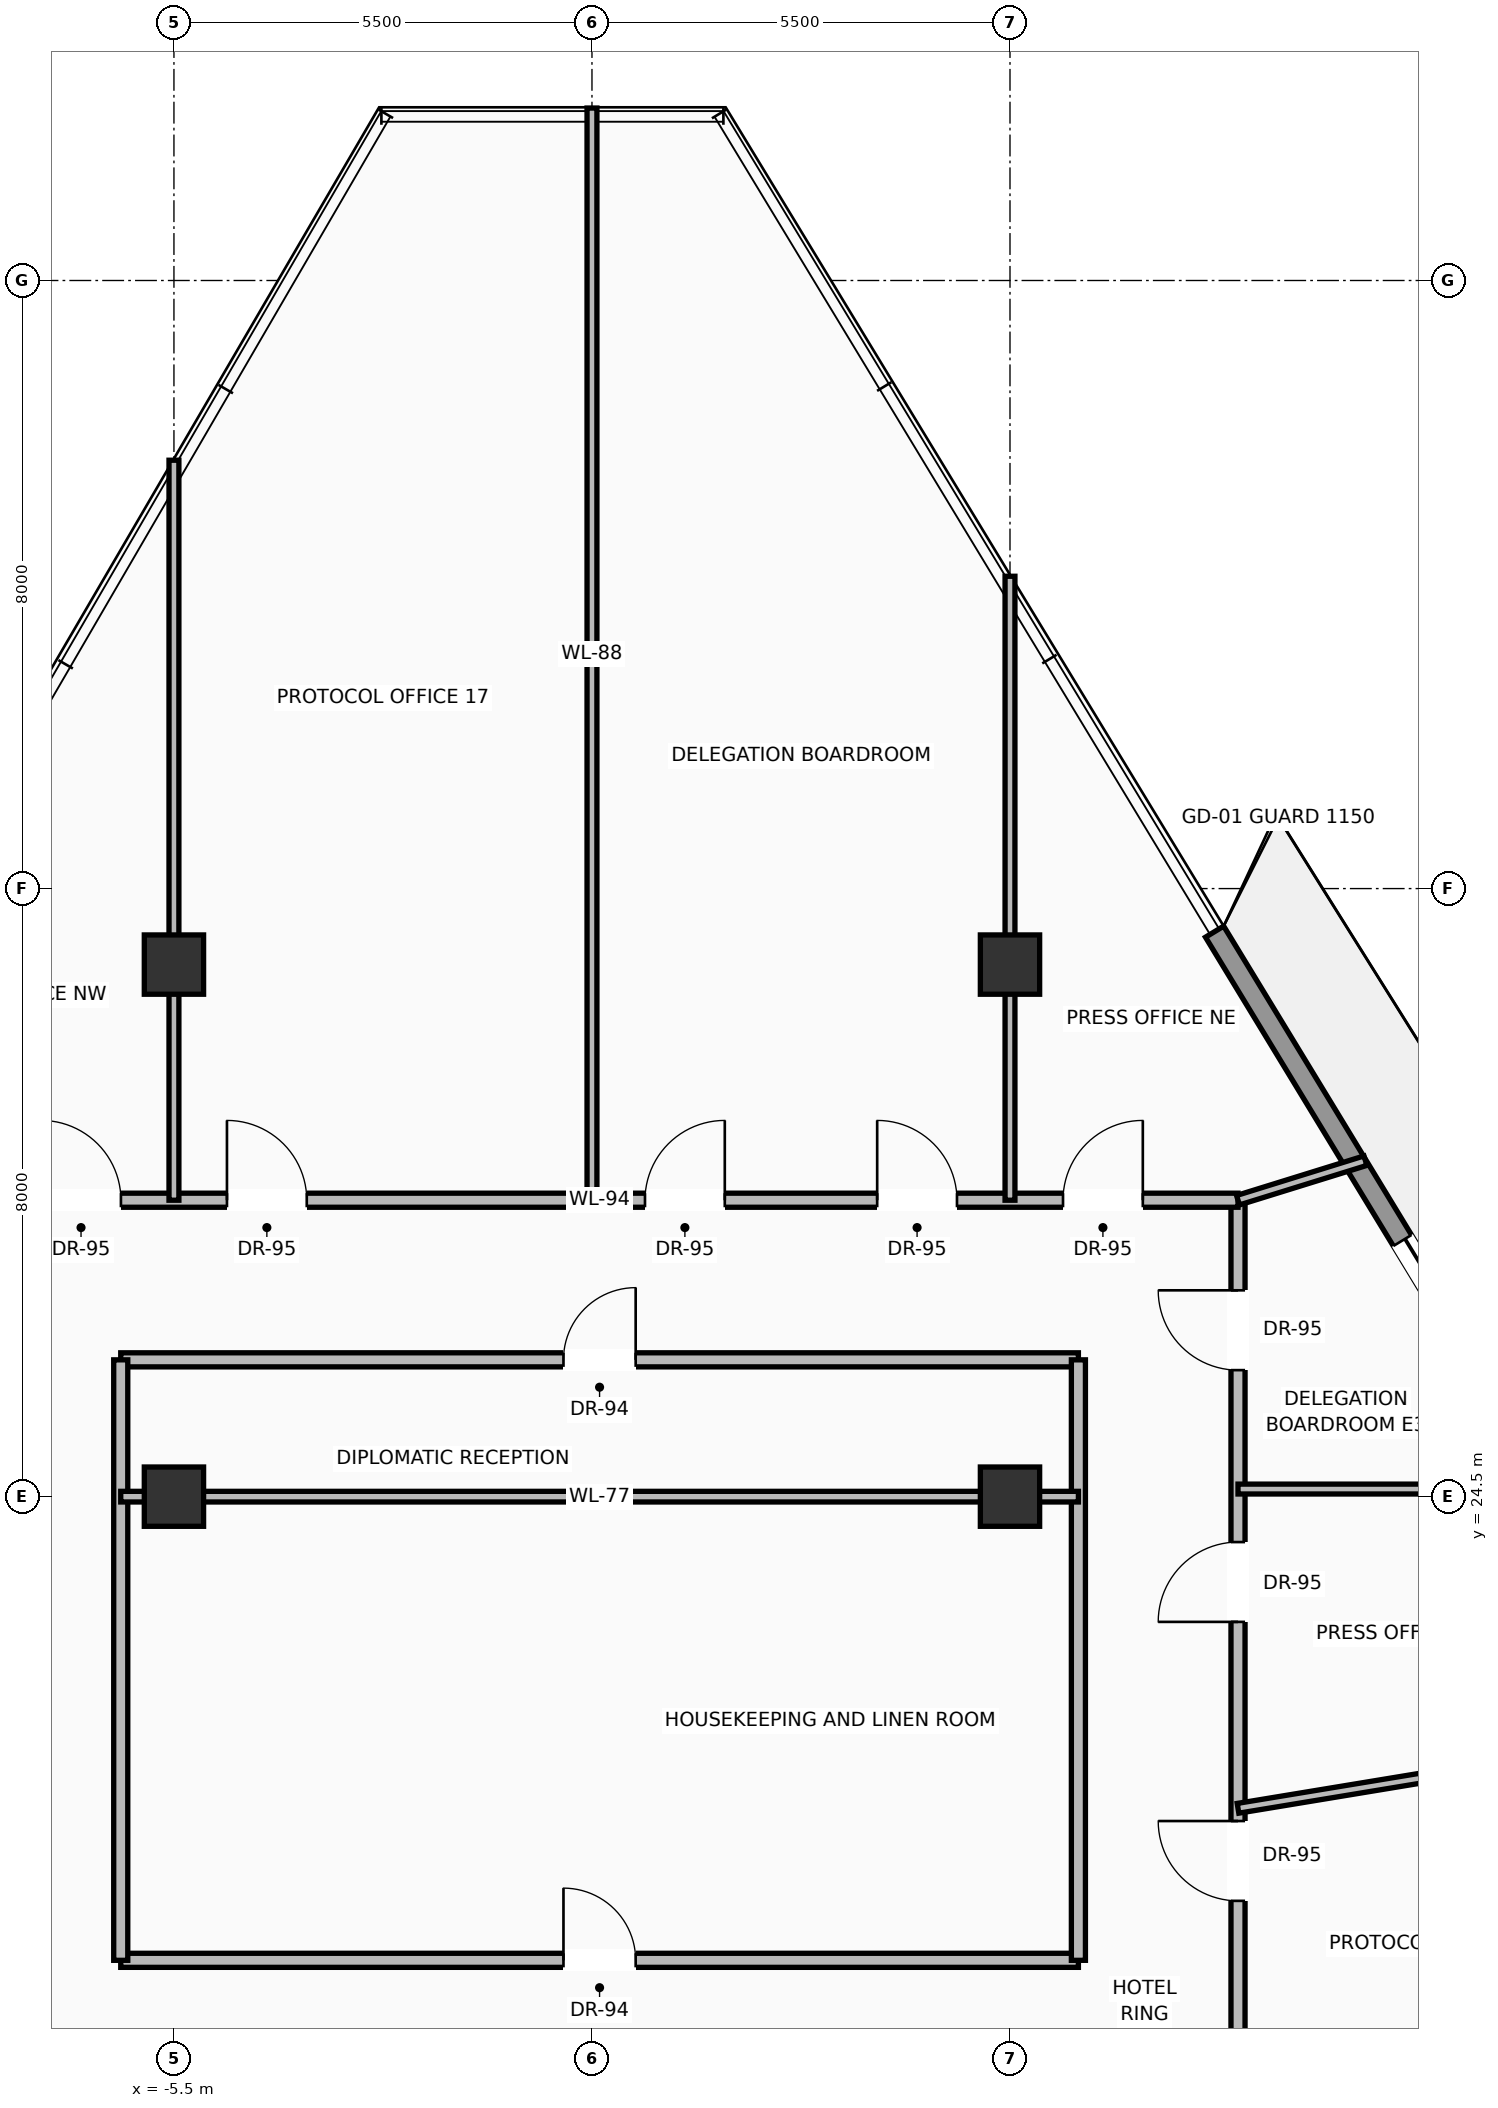
"""IFC4 building model, lengths in metres.
Left out: names, types, materials, properties, quantities, classifications, styles, units other than length and angle.
Written with IfcOpenShell. Run it as: python <this file> out.ifc"""

import sys

from ifc_helpers import new_model, si_unit, direction, frame, frame_2d, origin, origin_2d, place, context, subcontext, project, spatial, rectangle, extrude, source, transform, mapped, element, fill, save


model = new_model("IFC4")
c1 = context("Model", 3, precision=1e-05, world=origin(), true_north=direction((0.0, 1.0)))
c2 = subcontext(c1, "Body", "Model", "MODEL_VIEW")
j1 = project(units=[si_unit("LENGTHUNIT", "METRE"), si_unit("PLANEANGLEUNIT", "RADIAN")], contexts=[c1])
p1 = place(None, origin())
s1 = spatial("IfcSite", under=j1, at=p1, CompositionType="ELEMENT")
p2 = place(p1, origin())
s2 = spatial("IfcBuilding", under=s1, at=p2, CompositionType="ELEMENT")
p3 = place(p2, frame((0.0, 0.0, 254.5)))
s3 = spatial("IfcBuildingStorey", under=s2, at=p3, CompositionType="ELEMENT", Elevation=254.5)
m1 = source(origin(), c2, "Body", "SweptSolid", [
    extrude(rectangle(XDim=0.78, YDim=0.78, at=origin_2d()), origin(), (0.0, 0.0, 1.0), 3.45),
])
for number, where, z_axis, x_axis in (
    (1, (-5.5, 24.5, 0.0), (0.0, 0.0, 1.0), (1.0, 0.0, 0.0)),
    (2, (5.5, 24.5, 0.0), (0.0, 0.0, 1.0), (1.0, 0.0, 0.0)),
    (3, (-5.5, 31.5, 0.0), (0.0, 0.0, 1.0), (1.0, 0.0, 0.0)),
    (4, (5.5, 31.5, 0.0), (0.0, 0.0, 1.0), (1.0, 0.0, 0.0)),
):
    element("IfcColumn", number, at=place(p3, frame(where, z_axis=z_axis, x_axis=x_axis)), inside=s3, PredefinedType="COLUMN", context=c2, shape_type="MappedRepresentation", body=[
        mapped(m1, transform((0.0, 0.0, 0.0), scale=1.0)),
    ])
p4 = place(p3, frame((8.192, 31.933, 0.0), z_axis=(0.0, 0.0, 1.0), x_axis=(0.51964514921, -0.854382185502, 0.0)))
e5 = element("IfcWall", 5, at=p4, inside=s3, PredefinedType="SOLIDWALL", context=c2, shape_type="SweptSolid", body=[
    extrude(rectangle(XDim=19.814, YDim=0.28, at=frame_2d((9.907, 0.0))), origin(), (0.0, 0.0, 1.0), 2.73),
])
p5 = place(p4, frame((4.755, 0.0, 0.0)))
e6 = element("IfcOpeningElement", 6, at=p5, cuts=e5, PredefinedType="OPENING", context=c2, shape_type="SweptSolid", body=[
    extrude(rectangle(XDim=1.6, YDim=2.35, at=frame_2d((0.8, 1.175))), frame((0.0, 0.15, 0.0), z_axis=(0.0, -1.0, 0.0), x_axis=(1.0, 0.0, 0.0)), (0.0, 0.0, 1.0), 0.3),
])
p6 = place(p3, frame((-6.2, 18.4, 0.0), z_axis=(0.0, 0.0, 1.0), x_axis=(1.0, 0.0, 0.0)))
e7 = element("IfcWall", 7, at=p6, inside=s3, PredefinedType="PARTITIONING", context=c2, shape_type="SweptSolid", body=[
    extrude(rectangle(XDim=12.6, YDim=0.185, at=frame_2d((6.3, 0.0))), origin(), (0.0, 0.0, 1.0), 3.142),
])
p7 = place(p6, frame((5.825, 0.0, 0.0)))
e8 = element("IfcOpeningElement", 8, at=p7, cuts=e7, PredefinedType="OPENING", context=c2, shape_type="SweptSolid", body=[
    extrude(rectangle(XDim=0.95, YDim=2.2, at=frame_2d((0.475, 1.1))), frame((0.0, 0.103, 0.0), z_axis=(0.0, -1.0, 0.0), x_axis=(1.0, 0.0, 0.0)), (0.0, 0.0, 1.0), 0.205),
])
p8 = place(p3, frame((-6.2, 26.3, 0.0), z_axis=(0.0, 0.0, 1.0), x_axis=(1.0, 0.0, 0.0)))
e9 = element("IfcWall", 9, at=p8, inside=s3, PredefinedType="PARTITIONING", context=c2, shape_type="SweptSolid", body=[
    extrude(rectangle(XDim=12.6, YDim=0.185, at=frame_2d((6.3, 0.0))), origin(), (0.0, 0.0, 1.0), 3.142),
])
p9 = place(p8, frame((5.825, 0.0, 0.0)))
e10 = element("IfcOpeningElement", 10, at=p9, cuts=e9, PredefinedType="OPENING", context=c2, shape_type="SweptSolid", body=[
    extrude(rectangle(XDim=0.95, YDim=2.2, at=frame_2d((0.475, 1.1))), frame((0.0, 0.103, 0.0), z_axis=(0.0, -1.0, 0.0), x_axis=(1.0, 0.0, 0.0)), (0.0, 0.0, 1.0), 0.205),
])
for number, where, z_axis, x_axis in (
    (11, (-6.2, 18.4, 0.0), (0.0, 0.0, 1.0), (0.0, 1.0, 0.0)),
    (12, (6.4, 18.4, 0.0), (0.0, 0.0, 1.0), (0.0, 1.0, 0.0)),
):
    element("IfcWall", number, at=place(p3, frame(where, z_axis=z_axis, x_axis=x_axis)), inside=s3, PredefinedType="PARTITIONING", context=c2, shape_type="SweptSolid", body=[
        extrude(rectangle(XDim=7.9, YDim=0.185, at=frame_2d((3.95, 0.0))), origin(), (0.0, 0.0, 1.0), 3.142),
    ])
p10 = place(p3, frame((8.5, 16.3, 0.0), z_axis=(0.0, 0.0, 1.0), x_axis=(0.0, 1.0, 0.0)))
e13 = element("IfcWall", 13, at=p10, inside=s3, PredefinedType="PARTITIONING", context=c2, shape_type="SweptSolid", body=[
    extrude(rectangle(XDim=12.1, YDim=0.185, at=frame_2d((6.05, 0.0))), origin(), (0.0, 0.0, 1.0), 3.142),
])
p11 = place(p10, frame((2.882, 0.0, 0.0)))
e14 = element("IfcOpeningElement", 14, at=p11, cuts=e13, PredefinedType="OPENING", context=c2, shape_type="SweptSolid", body=[
    extrude(rectangle(XDim=1.05, YDim=2.25, at=frame_2d((0.525, 1.125))), frame((0.0, 0.103, 0.0), z_axis=(0.0, -1.0, 0.0), x_axis=(1.0, 0.0, 0.0)), (0.0, 0.0, 1.0), 0.205),
])
p12 = place(p10, frame((6.552, 0.0, 0.0)))
e15 = element("IfcOpeningElement", 15, at=p12, cuts=e13, PredefinedType="OPENING", context=c2, shape_type="SweptSolid", body=[
    extrude(rectangle(XDim=1.05, YDim=2.25, at=frame_2d((0.525, 1.125))), frame((0.0, 0.103, 0.0), z_axis=(0.0, -1.0, 0.0), x_axis=(1.0, 0.0, 0.0)), (0.0, 0.0, 1.0), 0.205),
])
p13 = place(p10, frame((9.865, 0.0, 0.0)))
e16 = element("IfcOpeningElement", 16, at=p13, cuts=e13, PredefinedType="OPENING", context=c2, shape_type="SweptSolid", body=[
    extrude(rectangle(XDim=1.05, YDim=2.25, at=frame_2d((0.525, 1.125))), frame((0.0, 0.103, 0.0), z_axis=(0.0, -1.0, 0.0), x_axis=(1.0, 0.0, 0.0)), (0.0, 0.0, 1.0), 0.205),
])
p14 = place(p3, frame((-8.3, 28.4, 0.0), z_axis=(0.0, 0.0, 1.0), x_axis=(1.0, 0.0, 0.0)))
e17 = element("IfcWall", 17, at=p14, inside=s3, PredefinedType="PARTITIONING", context=c2, shape_type="SweptSolid", body=[
    extrude(rectangle(XDim=16.8, YDim=0.185, at=frame_2d((8.4, 0.0))), origin(), (0.0, 0.0, 1.0), 3.142),
])
p15 = place(p14, frame((3.498, 0.0, 0.0)))
e18 = element("IfcOpeningElement", 18, at=p15, cuts=e17, PredefinedType="OPENING", context=c2, shape_type="SweptSolid", body=[
    extrude(rectangle(XDim=1.05, YDim=2.25, at=frame_2d((0.525, 1.125))), frame((0.0, 0.103, 0.0), z_axis=(0.0, -1.0, 0.0), x_axis=(1.0, 0.0, 0.0)), (0.0, 0.0, 1.0), 0.205),
])
p16 = place(p14, frame((8.998, 0.0, 0.0)))
e19 = element("IfcOpeningElement", 19, at=p16, cuts=e17, PredefinedType="OPENING", context=c2, shape_type="SweptSolid", body=[
    extrude(rectangle(XDim=1.05, YDim=2.25, at=frame_2d((0.525, 1.125))), frame((0.0, 0.103, 0.0), z_axis=(0.0, -1.0, 0.0), x_axis=(1.0, 0.0, 0.0)), (0.0, 0.0, 1.0), 0.205),
])
p17 = place(p14, frame((12.052, 0.0, 0.0)))
e20 = element("IfcOpeningElement", 20, at=p17, cuts=e17, PredefinedType="OPENING", context=c2, shape_type="SweptSolid", body=[
    extrude(rectangle(XDim=1.05, YDim=2.25, at=frame_2d((0.525, 1.125))), frame((0.0, 0.103, 0.0), z_axis=(0.0, -1.0, 0.0), x_axis=(1.0, 0.0, 0.0)), (0.0, 0.0, 1.0), 0.205),
])
p18 = place(p14, frame((14.498, 0.0, 0.0)))
e21 = element("IfcOpeningElement", 21, at=p18, cuts=e17, PredefinedType="OPENING", context=c2, shape_type="SweptSolid", body=[
    extrude(rectangle(XDim=1.05, YDim=2.25, at=frame_2d((0.525, 1.125))), frame((0.0, 0.103, 0.0), z_axis=(0.0, -1.0, 0.0), x_axis=(1.0, 0.0, 0.0)), (0.0, 0.0, 1.0), 0.205),
])
p19 = place(p14, frame((1.052, 0.0, 0.0)))
e22 = element("IfcOpeningElement", 22, at=p19, cuts=e17, PredefinedType="OPENING", context=c2, shape_type="SweptSolid", body=[
    extrude(rectangle(XDim=1.05, YDim=2.25, at=frame_2d((0.525, 1.125))), frame((0.0, 0.103, 0.0), z_axis=(0.0, -1.0, 0.0), x_axis=(1.0, 0.0, 0.0)), (0.0, 0.0, 1.0), 0.205),
])
p20 = place(p3, frame((-6.2, 24.5, 0.0), z_axis=(0.0, 0.0, 1.0), x_axis=(1.0, 0.0, 0.0)))
e23 = element("IfcWall", 23, at=p20, inside=s3, PredefinedType="PARTITIONING", context=c2, shape_type="SweptSolid", body=[
    extrude(rectangle(XDim=12.6, YDim=0.14, at=frame_2d((6.3, 0.0))), origin(), (0.0, 0.0, 1.0), 2.593),
])
p21 = place(p3, frame((8.5, 28.4, 0.0), z_axis=(0.0, 0.0, 1.0), x_axis=(0.955069567147, 0.296381716556, 0.0)))
e24 = element("IfcWall", 24, at=p21, inside=s3, PredefinedType="PARTITIONING", context=c2, shape_type="SweptSolid", body=[
    extrude(rectangle(XDim=1.755, YDim=0.13, at=frame_2d((0.878, 0.0))), origin(), (0.0, 0.0, 1.0), 3.142),
])
p22 = place(p3, frame((-5.5, 28.4, 0.0), z_axis=(0.0, 0.0, 1.0), x_axis=(0.0, 1.0, 0.0)))
e25 = element("IfcWall", 25, at=p22, inside=s3, PredefinedType="PARTITIONING", context=c2, shape_type="SweptSolid", body=[
    extrude(rectangle(XDim=9.736, YDim=0.13, at=frame_2d((4.868, 0.0))), origin(), (0.0, 0.0, 1.0), 2.593),
])
p23 = place(p3, frame((5.5, 28.4, 0.0), z_axis=(0.0, 0.0, 1.0), x_axis=(0.0, 1.0, 0.0)))
e26 = element("IfcWall", 26, at=p23, inside=s3, PredefinedType="PARTITIONING", context=c2, shape_type="SweptSolid", body=[
    extrude(rectangle(XDim=8.209, YDim=0.13, at=frame_2d((4.104, 0.0))), origin(), (0.0, 0.0, 1.0), 2.593),
])
p24 = place(p3, frame((0.0, 28.4, 0.0), z_axis=(0.0, 0.0, 1.0), x_axis=(0.0, 1.0, 0.0)))
e27 = element("IfcWall", 27, at=p24, inside=s3, PredefinedType="PARTITIONING", context=c2, shape_type="SweptSolid", body=[
    extrude(rectangle(XDim=14.369, YDim=0.13, at=frame_2d((7.185, 0.0))), origin(), (0.0, 0.0, 1.0), 3.142),
])
p25 = place(p3, frame((8.5, 20.4, 0.0), z_axis=(0.0, 0.0, 1.0), x_axis=(0.986649667214, 0.16285709744, 0.0)))
e28 = element("IfcWall", 28, at=p25, inside=s3, PredefinedType="PARTITIONING", context=c2, shape_type="SweptSolid", body=[
    extrude(rectangle(XDim=6.317, YDim=0.13, at=frame_2d((3.159, 0.0))), origin(), (0.0, 0.0, 1.0), 3.142),
])
p26 = place(p3, frame((8.5, 24.6, 0.0), z_axis=(0.0, 0.0, 1.0), x_axis=(1.0, 0.0, 0.0)))
e29 = element("IfcWall", 29, at=p26, inside=s3, PredefinedType="PARTITIONING", context=c2, shape_type="SweptSolid", body=[
    extrude(rectangle(XDim=4.304, YDim=0.13, at=frame_2d((2.152, 0.0))), origin(), (0.0, 0.0, 1.0), 2.593),
])
m2 = source(origin(), c2, "Body", "SweptSolid", [
    extrude(rectangle(XDim=1.6, YDim=2.35, at=frame_2d((0.8, 1.175))), frame((0.0, 0.025, 0.0), z_axis=(0.0, -1.0, 0.0), x_axis=(1.0, 0.0, 0.0)), (0.0, 0.0, 1.0), 0.05),
])
p27 = place(p5, origin())
e30 = element("IfcDoor", 30, at=p27, inside=s3, OperationType="SLIDING_TO_RIGHT", PredefinedType="DOOR", context=c2, shape_type="MappedRepresentation", body=[
    mapped(m2, transform((0.0, 0.0, 0.0), scale=1.0)),
])
fill(e6, e30)
m3 = source(origin(), c2, "Body", "SweptSolid", [
    extrude(rectangle(XDim=0.95, YDim=2.2, at=frame_2d((0.475, 1.1))), frame((0.0, 0.025, 0.0), z_axis=(0.0, -1.0, 0.0), x_axis=(1.0, 0.0, 0.0)), (0.0, 0.0, 1.0), 0.05),
])
p28 = place(p7, origin())
e31 = element("IfcDoor", 31, at=p28, inside=s3, OperationType="SINGLE_SWING_LEFT", PredefinedType="DOOR", context=c2, shape_type="MappedRepresentation", body=[
    mapped(m3, transform((0.0, 0.0, 0.0), scale=1.0)),
])
fill(e8, e31)
p29 = place(p9, origin())
e32 = element("IfcDoor", 32, at=p29, inside=s3, OperationType="SINGLE_SWING_RIGHT", PredefinedType="DOOR", context=c2, shape_type="MappedRepresentation", body=[
    mapped(m3, transform((0.0, 0.0, 0.0), scale=1.0)),
])
fill(e10, e32)
m4 = source(origin(), c2, "Body", "SweptSolid", [
    extrude(rectangle(XDim=1.05, YDim=2.25, at=frame_2d((0.525, 1.125))), frame((0.0, 0.025, 0.0), z_axis=(0.0, -1.0, 0.0), x_axis=(1.0, 0.0, 0.0)), (0.0, 0.0, 1.0), 0.05),
])
p30 = place(p11, origin())
e33 = element("IfcDoor", 33, at=p30, inside=s3, OperationType="SINGLE_SWING_RIGHT", PredefinedType="DOOR", context=c2, shape_type="MappedRepresentation", body=[
    mapped(m4, transform((0.0, 0.0, 0.0), scale=1.0)),
])
fill(e14, e33)
p31 = place(p12, origin())
e34 = element("IfcDoor", 34, at=p31, inside=s3, OperationType="SINGLE_SWING_LEFT", PredefinedType="DOOR", context=c2, shape_type="MappedRepresentation", body=[
    mapped(m4, transform((0.0, 0.0, 0.0), scale=1.0)),
])
fill(e15, e34)
p32 = place(p13, origin())
e35 = element("IfcDoor", 35, at=p32, inside=s3, OperationType="SINGLE_SWING_RIGHT", PredefinedType="DOOR", context=c2, shape_type="MappedRepresentation", body=[
    mapped(m4, transform((0.0, 0.0, 0.0), scale=1.0)),
])
fill(e16, e35)
p33 = place(p15, origin())
e36 = element("IfcDoor", 36, at=p33, inside=s3, OperationType="SINGLE_SWING_LEFT", PredefinedType="DOOR", context=c2, shape_type="MappedRepresentation", body=[
    mapped(m4, transform((0.0, 0.0, 0.0), scale=1.0)),
])
fill(e18, e36)
p34 = place(p16, origin())
e37 = element("IfcDoor", 37, at=p34, inside=s3, OperationType="SINGLE_SWING_RIGHT", PredefinedType="DOOR", context=c2, shape_type="MappedRepresentation", body=[
    mapped(m4, transform((0.0, 0.0, 0.0), scale=1.0)),
])
fill(e19, e37)
p35 = place(p17, origin())
e38 = element("IfcDoor", 38, at=p35, inside=s3, OperationType="SINGLE_SWING_LEFT", PredefinedType="DOOR", context=c2, shape_type="MappedRepresentation", body=[
    mapped(m4, transform((0.0, 0.0, 0.0), scale=1.0)),
])
fill(e20, e38)
p36 = place(p18, origin())
e39 = element("IfcDoor", 39, at=p36, inside=s3, OperationType="SINGLE_SWING_RIGHT", PredefinedType="DOOR", context=c2, shape_type="MappedRepresentation", body=[
    mapped(m4, transform((0.0, 0.0, 0.0), scale=1.0)),
])
fill(e21, e39)
p37 = place(p19, origin())
e40 = element("IfcDoor", 40, at=p37, inside=s3, OperationType="SINGLE_SWING_LEFT", PredefinedType="DOOR", context=c2, shape_type="MappedRepresentation", body=[
    mapped(m4, transform((0.0, 0.0, 0.0), scale=1.0)),
])
fill(e22, e40)
save(model, sys.argv[1])
